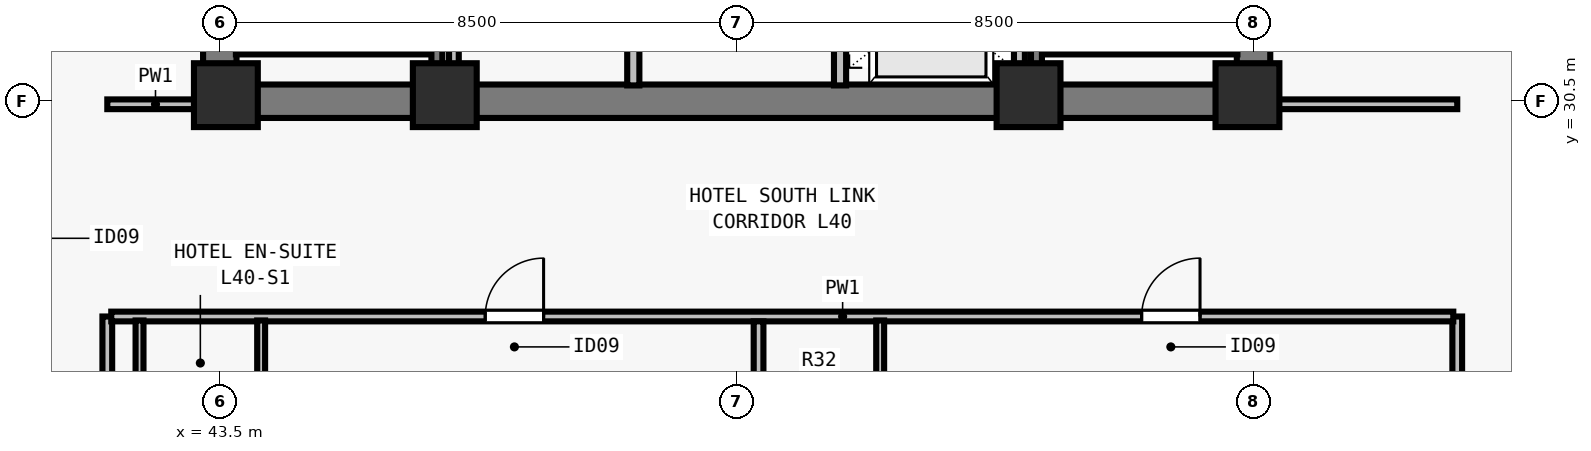
"""IFC4 building model, lengths in metres.
Left out: names, types, materials, properties, quantities, classifications, styles, units other than length and angle.
Written with IfcOpenShell. Run it as: python <this file> out.ifc"""

import sys

from ifc_helpers import new_model, si_unit, direction, frame, frame_2d, origin, origin_2d, place, context, subcontext, project, spatial, rectangle, extrude, element, fill, save


model = new_model("IFC4")
c1 = context("Model", 3, precision=1e-05, world=origin(), true_north=direction((0.0, 1.0)))
c2 = subcontext(c1, "Body", "Model", "MODEL_VIEW")
j1 = project(units=[si_unit("LENGTHUNIT", "METRE"), si_unit("PLANEANGLEUNIT", "RADIAN")], contexts=[c1])
p1 = place(None, origin())
s1 = spatial("IfcSite", under=j1, at=p1, CompositionType="ELEMENT")
p2 = place(p1, origin())
s2 = spatial("IfcBuilding", under=s1, at=p2, CompositionType="ELEMENT")
p3 = place(p2, frame((0.0, 0.0, 148.0)))
s3 = spatial("IfcBuildingStorey", under=s2, at=p3, CompositionType="ELEMENT", Elevation=148.0)
for number, where, z_axis, x_axis in (
    (1, (43.6, 30.6, 0.0), (0.0, 0.0, 1.0), (1.0, 0.0, 0.0)),
    (2, (47.2, 30.6, 0.0), (0.0, 0.0, 1.0), (1.0, 0.0, 0.0)),
    (3, (56.8, 30.6, 0.0), (0.0, 0.0, 1.0), (1.0, 0.0, 0.0)),
    (4, (60.4, 30.6, 0.0), (0.0, 0.0, 1.0), (1.0, 0.0, 0.0)),
):
    element("IfcColumn", number, at=place(p3, frame(where, z_axis=z_axis, x_axis=x_axis)), inside=s3, PredefinedType="COLUMN", context=c2, shape_type="SweptSolid", body=[
        extrude(rectangle(XDim=1.05, YDim=1.05, at=origin_2d()), origin(), (0.0, 0.0, 1.0), 3.5),
    ])
p4 = place(p3, frame((43.225, 30.5, 0.0), z_axis=(0.0, 0.0, 1.0), x_axis=(1.0, 0.0, 0.0)))
e5 = element("IfcWall", 5, at=p4, inside=s3, PredefinedType="SHEAR", context=c2, shape_type="SweptSolid", body=[
    extrude(rectangle(XDim=17.55, YDim=0.55, at=frame_2d((8.775, 0.0))), origin(), (0.0, 0.0, 1.0), 3.28),
])
for number, where, z_axis, x_axis in (
    (6, (43.5, 30.765, 0.0), (0.0, 0.0, 1.0), (0.0, 1.0, 0.0)),
    (7, (60.5, 30.765, 0.0), (0.0, 0.0, 1.0), (0.0, 1.0, 0.0)),
):
    element("IfcWall", number, at=place(p3, frame(where, z_axis=z_axis, x_axis=x_axis)), inside=s3, PredefinedType="SHEAR", context=c2, shape_type="SweptSolid", body=[
        extrude(rectangle(XDim=7.985, YDim=0.55, at=frame_2d((3.993, 0.0))), origin(), (0.0, 0.0, 1.0), 3.28),
    ])
p5 = place(p3, frame((50.3, 30.76, 0.0), z_axis=(0.0, 0.0, 1.0), x_axis=(0.0, 1.0, 0.0)))
e8 = element("IfcWall", 8, at=p5, inside=s3, PredefinedType="SOLIDWALL", context=c2, shape_type="SweptSolid", body=[
    extrude(rectangle(XDim=7.855, YDim=0.2, at=frame_2d((3.927, 0.0))), origin(), (0.0, 0.0, 1.0), 3.28),
])
p6 = place(p5, frame((1.34, 0.0, 0.0)))
e9 = element("IfcOpeningElement", 9, at=p6, cuts=e8, PredefinedType="OPENING", context=c2, shape_type="SweptSolid", body=[
    extrude(rectangle(XDim=0.9, YDim=2.12, at=frame_2d((0.45, 1.06))), frame((0.0, 0.11, 0.0), z_axis=(0.0, -1.0, 0.0), x_axis=(1.0, 0.0, 0.0)), (0.0, 0.0, 1.0), 0.22),
])
p7 = place(p5, frame((5.34, 0.0, 0.0)))
e10 = element("IfcOpeningElement", 10, at=p7, cuts=e8, PredefinedType="OPENING", context=c2, shape_type="SweptSolid", body=[
    extrude(rectangle(XDim=0.9, YDim=2.12, at=frame_2d((0.45, 1.06))), frame((0.0, 0.11, 0.0), z_axis=(0.0, -1.0, 0.0), x_axis=(1.0, 0.0, 0.0)), (0.0, 0.0, 1.0), 0.22),
])
p8 = place(p3, frame((53.7, 30.76, 0.0), z_axis=(0.0, 0.0, 1.0), x_axis=(0.0, 1.0, 0.0)))
e11 = element("IfcWall", 11, at=p8, inside=s3, PredefinedType="SOLIDWALL", context=c2, shape_type="SweptSolid", body=[
    extrude(rectangle(XDim=7.855, YDim=0.2, at=frame_2d((3.927, 0.0))), origin(), (0.0, 0.0, 1.0), 3.28),
])
p9 = place(p8, frame((0.79, 0.0, 0.0)))
e12 = element("IfcOpeningElement", 12, at=p9, cuts=e11, PredefinedType="OPENING", context=c2, shape_type="SweptSolid", body=[
    extrude(rectangle(XDim=1.1, YDim=2.2, at=frame_2d((0.55, 1.1))), frame((0.0, 0.11, 0.0), z_axis=(0.0, -1.0, 0.0), x_axis=(1.0, 0.0, 0.0)), (0.0, 0.0, 1.0), 0.22),
])
p10 = place(p8, frame((3.49, 0.0, 0.0)))
e13 = element("IfcOpeningElement", 13, at=p10, cuts=e11, PredefinedType="OPENING", context=c2, shape_type="SweptSolid", body=[
    extrude(rectangle(XDim=1.1, YDim=2.2, at=frame_2d((0.55, 1.1))), frame((0.0, 0.11, 0.0), z_axis=(0.0, -1.0, 0.0), x_axis=(1.0, 0.0, 0.0)), (0.0, 0.0, 1.0), 0.22),
])
p11 = place(p8, frame((6.19, 0.0, 0.0)))
e14 = element("IfcOpeningElement", 14, at=p11, cuts=e11, PredefinedType="OPENING", context=c2, shape_type="SweptSolid", body=[
    extrude(rectangle(XDim=1.1, YDim=2.2, at=frame_2d((0.55, 1.1))), frame((0.0, 0.11, 0.0), z_axis=(0.0, -1.0, 0.0), x_axis=(1.0, 0.0, 0.0)), (0.0, 0.0, 1.0), 0.22),
])
p12 = place(p3, frame((47.35, 30.76, 0.0), z_axis=(0.0, 0.0, 1.0), x_axis=(0.0, 1.0, 0.0)))
e15 = element("IfcWall", 15, at=p12, inside=s3, PredefinedType="PARTITIONING", context=c2, shape_type="SweptSolid", body=[
    extrude(rectangle(XDim=7.855, YDim=0.16, at=frame_2d((3.927, 0.0))), origin(), (0.0, 0.0, 1.0), 3.28),
])
p13 = place(p3, frame((56.65, 30.76, 0.0), z_axis=(0.0, 0.0, 1.0), x_axis=(0.0, 1.0, 0.0)))
e16 = element("IfcWall", 16, at=p13, inside=s3, PredefinedType="SOLIDWALL", context=c2, shape_type="SweptSolid", body=[
    extrude(rectangle(XDim=7.855, YDim=0.18, at=frame_2d((3.927, 0.0))), origin(), (0.0, 0.0, 1.0), 3.28),
])
p14 = place(p3, frame((41.65, 15.415, 0.0), z_axis=(0.0, 0.0, 1.0), x_axis=(0.0, 1.0, 0.0)))
e17 = element("IfcWall", 17, at=p14, inside=s3, PredefinedType="PARTITIONING", context=c2, shape_type="SweptSolid", body=[
    extrude(rectangle(XDim=11.545, YDim=0.16, at=frame_2d((5.772, 0.0))), origin(), (0.0, 0.0, 1.0), 3.28),
])
p15 = place(p3, frame((41.65, 30.45, 0.0), z_axis=(0.0, 0.0, 1.0), x_axis=(1.0, 0.0, 0.0)))
e18 = element("IfcWall", 18, at=p15, inside=s3, PredefinedType="PARTITIONING", context=c2, shape_type="SweptSolid", body=[
    extrude(rectangle(XDim=1.585, YDim=0.16, at=frame_2d((0.792, 0.0))), origin(), (0.0, 0.0, 1.0), 3.28),
])
p16 = place(p3, frame((63.85, 15.325, 0.0), z_axis=(0.0, 0.0, 1.0), x_axis=(0.0, 1.0, 0.0)))
e19 = element("IfcWall", 19, at=p16, inside=s3, PredefinedType="PARTITIONING", context=c2, shape_type="SweptSolid", body=[
    extrude(rectangle(XDim=11.635, YDim=0.16, at=frame_2d((5.817, 0.0))), origin(), (0.0, 0.0, 1.0), 2.555),
])
p17 = place(p3, frame((60.765, 30.45, 0.0), z_axis=(0.0, 0.0, 1.0), x_axis=(1.0, 0.0, 0.0)))
e20 = element("IfcWall", 20, at=p17, inside=s3, PredefinedType="PARTITIONING", context=c2, shape_type="SweptSolid", body=[
    extrude(rectangle(XDim=3.085, YDim=0.16, at=frame_2d((1.542, 0.0))), origin(), (0.0, 0.0, 1.0), 3.28),
])
p18 = place(p3, frame((41.715, 26.96, 0.0), z_axis=(0.0, 0.0, 1.0), x_axis=(1.0, 0.0, 0.0)))
e21 = element("IfcWall", 21, at=p18, inside=s3, PredefinedType="PARTITIONING", context=c2, shape_type="SweptSolid", body=[
    extrude(rectangle(XDim=22.07, YDim=0.16, at=frame_2d((11.035, 0.0))), origin(), (0.0, 0.0, 1.0), 3.28),
])
p19 = place(p18, frame((6.15, 0.0, 0.0)))
e22 = element("IfcOpeningElement", 22, at=p19, cuts=e21, PredefinedType="OPENING", context=c2, shape_type="SweptSolid", body=[
    extrude(rectangle(XDim=0.96, YDim=2.15, at=frame_2d((0.48, 1.075))), frame((0.0, 0.09, 0.0), z_axis=(0.0, -1.0, 0.0), x_axis=(1.0, 0.0, 0.0)), (0.0, 0.0, 1.0), 0.18),
])
p20 = place(p18, frame((16.945, 0.0, 0.0)))
e23 = element("IfcOpeningElement", 23, at=p20, cuts=e21, PredefinedType="OPENING", context=c2, shape_type="SweptSolid", body=[
    extrude(rectangle(XDim=0.96, YDim=2.15, at=frame_2d((0.48, 1.075))), frame((0.0, 0.09, 0.0), z_axis=(0.0, -1.0, 0.0), x_axis=(1.0, 0.0, 0.0)), (0.0, 0.0, 1.0), 0.18),
])
for number, where, z_axis, x_axis in (
    (24, (42.18, 24.58, 0.0), (0.0, 0.0, 1.0), (0.0, 1.0, 0.0)),
    (25, (44.18, 24.58, 0.0), (0.0, 0.0, 1.0), (0.0, 1.0, 0.0)),
):
    element("IfcWall", number, at=place(p3, frame(where, z_axis=z_axis, x_axis=x_axis)), inside=s3, PredefinedType="PLUMBINGWALL", context=c2, shape_type="SweptSolid", body=[
        extrude(rectangle(XDim=2.315, YDim=0.13, at=frame_2d((1.157, 0.0))), origin(), (0.0, 0.0, 1.0), 3.28),
    ])
p21 = place(p3, frame((52.36, 15.325, 0.0), z_axis=(0.0, 0.0, 1.0), x_axis=(0.0, 1.0, 0.0)))
e26 = element("IfcWall", 26, at=p21, inside=s3, PredefinedType="PARTITIONING", context=c2, shape_type="SweptSolid", body=[
    extrude(rectangle(XDim=11.555, YDim=0.16, at=frame_2d((5.777, 0.0))), origin(), (0.0, 0.0, 1.0), 2.896),
])
p22 = place(p3, frame((54.36, 24.58, 0.0), z_axis=(0.0, 0.0, 1.0), x_axis=(0.0, 1.0, 0.0)))
e27 = element("IfcWall", 27, at=p22, inside=s3, PredefinedType="PLUMBINGWALL", context=c2, shape_type="SweptSolid", body=[
    extrude(rectangle(XDim=2.315, YDim=0.13, at=frame_2d((1.157, 0.0))), origin(), (0.0, 0.0, 1.0), 2.896),
])
p23 = place(p3, frame((43.765, 31.36, 0.0), z_axis=(0.0, 0.0, 1.0), x_axis=(1.0, 0.0, 0.0)))
e28 = element("IfcWall", 28, at=p23, inside=s3, PredefinedType="SOLIDWALL", context=c2, shape_type="SweptSolid", body=[
    extrude(rectangle(XDim=3.23, YDim=0.18, at=frame_2d((1.615, 0.0))), origin(), (0.0, 0.0, 1.0), 3.28),
])
p24 = place(p3, frame((47.07, 38.78, 0.0), z_axis=(0.0, 0.0, 1.0), x_axis=(0.0, -1.0, 0.0)))
e29 = element("IfcWall", 29, at=p24, inside=s3, PredefinedType="SOLIDWALL", context=c2, shape_type="SweptSolid", body=[
    extrude(rectangle(XDim=8.017, YDim=0.18, at=frame_2d((4.009, 0.0))), origin(), (0.0, 0.0, 1.0), 3.28),
])
p25 = place(p3, frame((57.005, 31.36, 0.0), z_axis=(0.0, 0.0, 1.0), x_axis=(1.0, 0.0, 0.0)))
e30 = element("IfcWall", 30, at=p25, inside=s3, PredefinedType="SOLIDWALL", context=c2, shape_type="SweptSolid", body=[
    extrude(rectangle(XDim=3.23, YDim=0.18, at=frame_2d((1.615, 0.0))), origin(), (0.0, 0.0, 1.0), 3.28),
])
p26 = place(p3, frame((56.93, 38.78, 0.0), z_axis=(0.0, 0.0, 1.0), x_axis=(0.0, -1.0, 0.0)))
e31 = element("IfcWall", 31, at=p26, inside=s3, PredefinedType="SOLIDWALL", context=c2, shape_type="SweptSolid", body=[
    extrude(rectangle(XDim=8.017, YDim=0.18, at=frame_2d((4.009, 0.0))), origin(), (0.0, 0.0, 1.0), 3.28),
])
p27 = place(p19, origin())
e32 = element("IfcDoor", 32, at=p27, inside=s3, OperationType="SINGLE_SWING_RIGHT", PredefinedType="DOOR", context=c2, shape_type="SweptSolid", body=[
    extrude(rectangle(XDim=0.96, YDim=2.15, at=frame_2d((0.48, 1.075))), frame((0.0, 0.025, 0.0), z_axis=(0.0, -1.0, 0.0), x_axis=(1.0, 0.0, 0.0)), (0.0, 0.0, 1.0), 0.05),
])
fill(e22, e32)
p28 = place(p20, origin())
e33 = element("IfcDoor", 33, at=p28, inside=s3, OperationType="SINGLE_SWING_RIGHT", PredefinedType="DOOR", context=c2, shape_type="SweptSolid", body=[
    extrude(rectangle(XDim=0.96, YDim=2.15, at=frame_2d((0.48, 1.075))), frame((0.0, 0.025, 0.0), z_axis=(0.0, -1.0, 0.0), x_axis=(1.0, 0.0, 0.0)), (0.0, 0.0, 1.0), 0.05),
])
fill(e23, e33)
save(model, sys.argv[1])
